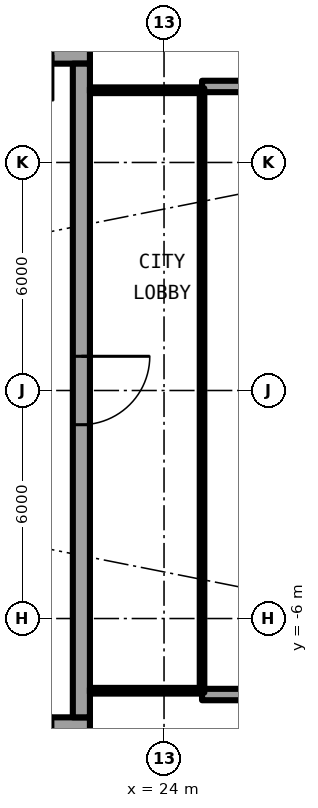
"""IFC4 building model, lengths in metres.
Left out: names, types, materials, properties, quantities, classifications, styles, units other than length and angle.
Written with IfcOpenShell. Run it as: python <this file> out.ifc"""

import sys

from ifc_helpers import new_model, si_unit, direction, frame, frame_2d, origin, place, context, subcontext, project, spatial, rectangle, extrude, element, fill, save


model = new_model("IFC4")
c1 = context("Model", 3, precision=1e-05, world=origin(), true_north=direction((0.0, 1.0)))
c2 = subcontext(c1, "Body", "Model", "MODEL_VIEW")
j1 = project(units=[si_unit("LENGTHUNIT", "METRE"), si_unit("PLANEANGLEUNIT", "RADIAN")], contexts=[c1])
p1 = place(None, origin())
s1 = spatial("IfcSite", under=j1, at=p1, CompositionType="ELEMENT")
p2 = place(p1, origin())
s2 = spatial("IfcBuilding", under=s1, at=p2, CompositionType="ELEMENT")
p3 = place(p2, frame((0.0, 0.0, 208.5)))
s3 = spatial("IfcBuildingStorey", under=s2, at=p3, CompositionType="ELEMENT", Elevation=208.5)
for number, where, z_axis, x_axis in (
    (1, (25.0, 8.0, 0.0), (0.0, 0.0, 1.0), (1.0, 0.0, 0.0)),
    (2, (25.0, -8.0, 0.0), (0.0, 0.0, 1.0), (1.0, 0.0, 0.0)),
):
    element("IfcWall", number, at=place(p3, frame(where, z_axis=z_axis, x_axis=x_axis)), inside=s3, PredefinedType="SOLIDWALL", context=c2, shape_type="SweptSolid", body=[
        extrude(rectangle(XDim=2.667, YDim=0.3, at=frame_2d((1.333, 0.0))), origin(), (0.0, 0.0, 1.0), 3.85),
    ])
p4 = place(p3, frame((22.05, 8.825, 0.0), z_axis=(0.0, 0.0, 1.0), x_axis=(-1.0, 0.0, 0.0)))
e3 = element("IfcWall", 3, at=p4, inside=s3, PredefinedType="SHEAR", context=c2, shape_type="SweptSolid", body=[
    extrude(rectangle(XDim=13.5, YDim=0.45, at=frame_2d((6.75, 0.0))), origin(), (0.0, 0.0, 1.0), 4.2),
])
p5 = place(p4, frame((0.975, 0.0, 0.0)))
e4 = element("IfcOpeningElement", 4, at=p5, cuts=e3, PredefinedType="OPENING", context=c2, shape_type="SweptSolid", body=[
    extrude(rectangle(XDim=1.2, YDim=2.3, at=frame_2d((0.6, 1.15))), frame((0.0, 0.235, 0.0), z_axis=(0.0, -1.0, 0.0), x_axis=(1.0, 0.0, 0.0)), (0.0, 0.0, 1.0), 0.47),
])
p6 = place(p3, frame((8.55, -8.825, 0.0), z_axis=(0.0, 0.0, 1.0), x_axis=(1.0, 0.0, 0.0)))
e5 = element("IfcWall", 5, at=p6, inside=s3, PredefinedType="SHEAR", context=c2, shape_type="SweptSolid", body=[
    extrude(rectangle(XDim=13.5, YDim=0.45, at=frame_2d((6.75, 0.0))), origin(), (0.0, 0.0, 1.0), 4.2),
])
p7 = place(p6, frame((11.325, 0.0, 0.0)))
e6 = element("IfcOpeningElement", 6, at=p7, cuts=e5, PredefinedType="OPENING", context=c2, shape_type="SweptSolid", body=[
    extrude(rectangle(XDim=1.2, YDim=2.3, at=frame_2d((0.6, 1.15))), frame((0.0, 0.235, 0.0), z_axis=(0.0, -1.0, 0.0), x_axis=(1.0, 0.0, 0.0)), (0.0, 0.0, 1.0), 0.47),
])
p8 = place(p3, frame((21.825, 8.6, 0.0), z_axis=(0.0, 0.0, 1.0), x_axis=(0.0, -1.0, 0.0)))
e7 = element("IfcWall", 7, at=p8, inside=s3, PredefinedType="SHEAR", context=c2, shape_type="SweptSolid", body=[
    extrude(rectangle(XDim=17.2, YDim=0.45, at=frame_2d((8.6, 0.0))), origin(), (0.0, 0.0, 1.0), 4.2),
])
p9 = place(p8, frame((7.7, 0.0, 0.0)))
e8 = element("IfcOpeningElement", 8, at=p9, cuts=e7, PredefinedType="OPENING", context=c2, shape_type="SweptSolid", body=[
    extrude(rectangle(XDim=1.8, YDim=2.3, at=frame_2d((0.9, 1.15))), frame((0.0, 0.235, 0.0), z_axis=(0.0, -1.0, 0.0), x_axis=(1.0, 0.0, 0.0)), (0.0, 0.0, 1.0), 0.47),
])
for number, where, z_axis, x_axis in (
    (9, (22.05, -7.9, 0.0), (0.0, 0.0, 1.0), (1.0, 0.0, 0.0)),
    (10, (22.05, 7.9, 0.0), (0.0, 0.0, 1.0), (1.0, 0.0, 0.0)),
):
    element("IfcWall", number, at=place(p3, frame(where, z_axis=z_axis, x_axis=x_axis)), inside=s3, PredefinedType="PARTITIONING", context=c2, shape_type="SweptSolid", body=[
        extrude(rectangle(XDim=2.89, YDim=0.15, at=frame_2d((1.445, 0.0))), origin(), (0.0, 0.0, 1.0), 3.85),
    ])
p10 = place(p3, frame((25.0, -7.95, 0.0), z_axis=(0.0, 0.0, 1.0), x_axis=(0.0, 1.0, 0.0)))
e11 = element("IfcWall", 11, at=p10, inside=s3, PredefinedType="PARTITIONING", context=c2, shape_type="SweptSolid", body=[
    extrude(rectangle(XDim=15.9, YDim=0.12, at=frame_2d((7.95, 0.0))), origin(), (0.0, 0.0, 1.0), 3.85),
])
p11 = place(p10, frame((0.95, 0.0, 0.1)))
e12 = element("IfcOpeningElement", 12, at=p11, cuts=e11, PredefinedType="OPENING", context=c2, shape_type="SweptSolid", body=[
    extrude(rectangle(XDim=14.0, YDim=3.5, at=frame_2d((7.0, 1.75))), frame((0.0, 0.07, 0.0), z_axis=(0.0, -1.0, 0.0), x_axis=(1.0, 0.0, 0.0)), (0.0, 0.0, 1.0), 0.14),
])
p12 = place(p5, origin())
e13 = element("IfcDoor", 13, at=p12, inside=s3, OperationType="SINGLE_SWING_RIGHT", PredefinedType="DOOR", context=c2, shape_type="SweptSolid", body=[
    extrude(rectangle(XDim=1.2, YDim=2.3, at=frame_2d((0.6, 1.15))), frame((0.0, 0.025, 0.0), z_axis=(0.0, -1.0, 0.0), x_axis=(1.0, 0.0, 0.0)), (0.0, 0.0, 1.0), 0.05),
])
fill(e4, e13)
p13 = place(p7, origin())
e14 = element("IfcDoor", 14, at=p13, inside=s3, OperationType="SINGLE_SWING_LEFT", PredefinedType="DOOR", context=c2, shape_type="SweptSolid", body=[
    extrude(rectangle(XDim=1.2, YDim=2.3, at=frame_2d((0.6, 1.15))), frame((0.0, 0.025, 0.0), z_axis=(0.0, -1.0, 0.0), x_axis=(1.0, 0.0, 0.0)), (0.0, 0.0, 1.0), 0.05),
])
fill(e6, e14)
p14 = place(p9, origin())
e15 = element("IfcDoor", 15, at=p14, inside=s3, OperationType="SINGLE_SWING_LEFT", PredefinedType="DOOR", context=c2, shape_type="SweptSolid", body=[
    extrude(rectangle(XDim=1.8, YDim=2.3, at=frame_2d((0.9, 1.15))), frame((0.0, 0.025, 0.0), z_axis=(0.0, -1.0, 0.0), x_axis=(1.0, 0.0, 0.0)), (0.0, 0.0, 1.0), 0.05),
])
fill(e8, e15)
p15 = place(p11, origin())
e16 = element("IfcWindow", 16, at=p15, inside=s3, PartitioningType="SINGLE_PANEL", PredefinedType="WINDOW", context=c2, shape_type="SweptSolid", body=[
    extrude(rectangle(XDim=14.0, YDim=3.5, at=frame_2d((7.0, 1.75))), frame((0.0, 0.03, 0.0), z_axis=(0.0, -1.0, 0.0), x_axis=(1.0, 0.0, 0.0)), (0.0, 0.0, 1.0), 0.06),
])
fill(e12, e16)
save(model, sys.argv[1])
